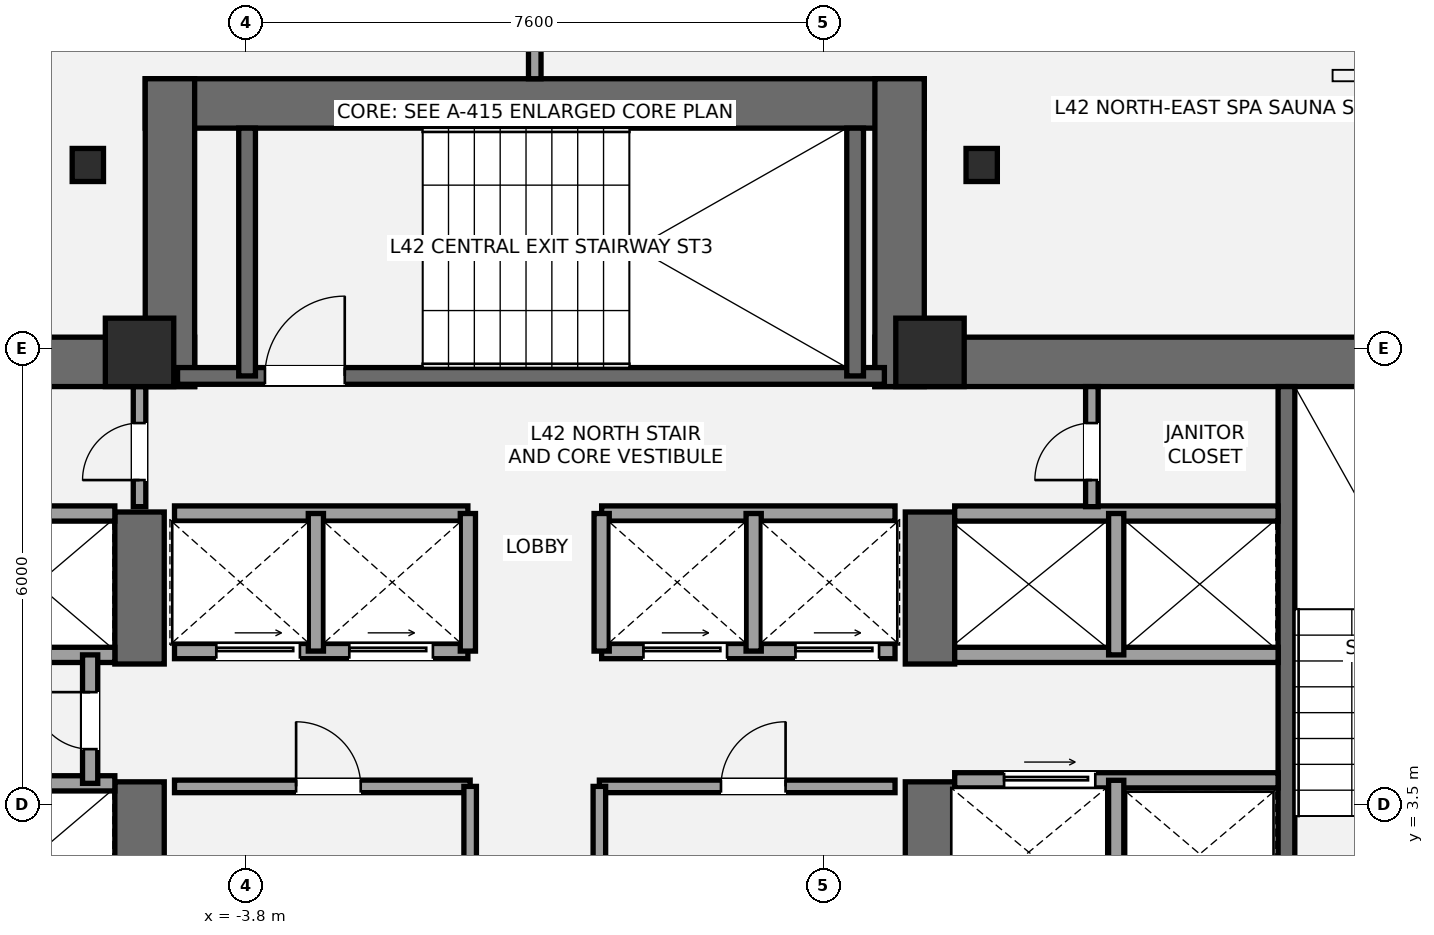
"""IFC4 building model, lengths in metres.
Left out: names, types, materials, properties, quantities, classifications, styles, units other than length and angle.
Written with IfcOpenShell. Run it as: python <this file> out.ifc"""

import sys

from ifc_helpers import new_model, si_unit, direction, frame, frame_2d, origin, origin_2d, place, context, subcontext, project, spatial, rectangle, i_section, extrude, element, fill, save


model = new_model("IFC4")
c1 = context("Model", 3, precision=1e-05, world=origin(), true_north=direction((0.0, 1.0)))
c2 = subcontext(c1, "Body", "Model", "MODEL_VIEW")
j1 = project(units=[si_unit("LENGTHUNIT", "METRE"), si_unit("PLANEANGLEUNIT", "RADIAN")], contexts=[c1])
p1 = place(None, origin())
s1 = spatial("IfcSite", under=j1, at=p1, CompositionType="ELEMENT")
p2 = place(p1, origin())
s2 = spatial("IfcBuilding", under=s1, at=p2, CompositionType="ELEMENT")
p3 = place(p2, frame((0.0, 0.0, 156.6)))
s3 = spatial("IfcBuildingStorey", under=s2, at=p3, CompositionType="ELEMENT", Elevation=156.6)
p4 = place(p3, frame((-13.8, 9.325, 0.0), z_axis=(0.0, 0.0, 1.0), x_axis=(1.0, 0.0, 0.0)))
e1 = element("IfcWall", 1, at=p4, inside=s3, PredefinedType="SHEAR", context=c2, shape_type="SweptSolid", body=[
    extrude(rectangle(XDim=9.325, YDim=0.65, at=frame_2d((4.663, 0.0))), origin(), (0.0, 0.0, 1.0), 3.2),
])
p5 = place(p3, frame((-5.2, 1.2, 0.0), z_axis=(0.0, 0.0, 1.0), x_axis=(0.0, 1.0, 0.0)))
e2 = element("IfcWall", 2, at=p5, inside=s3, PredefinedType="SHEAR", context=c2, shape_type="SweptSolid", body=[
    extrude(rectangle(XDim=2.6, YDim=0.65, at=frame_2d((1.3, 0.0))), origin(), (0.0, 0.0, 1.0), 3.2),
])
p6 = place(p3, frame((-5.2, 5.35, 0.0), z_axis=(0.0, 0.0, 1.0), x_axis=(0.0, 1.0, 0.0)))
e3 = element("IfcWall", 3, at=p6, inside=s3, PredefinedType="SHEAR", context=c2, shape_type="SweptSolid", body=[
    extrude(rectangle(XDim=2.0, YDim=0.65, at=frame_2d((1.0, 0.0))), origin(), (0.0, 0.0, 1.0), 3.2),
])
p7 = place(p3, frame((4.475, 9.325, 0.0), z_axis=(0.0, 0.0, 1.0), x_axis=(1.0, 0.0, 0.0)))
e4 = element("IfcWall", 4, at=p7, inside=s3, PredefinedType="SHEAR", context=c2, shape_type="SweptSolid", body=[
    extrude(rectangle(XDim=9.325, YDim=0.65, at=frame_2d((4.663, 0.0))), origin(), (0.0, 0.0, 1.0), 3.2),
])
p8 = place(p3, frame((5.2, 1.2, 0.0), z_axis=(0.0, 0.0, 1.0), x_axis=(0.0, 1.0, 0.0)))
e5 = element("IfcWall", 5, at=p8, inside=s3, PredefinedType="SHEAR", context=c2, shape_type="SweptSolid", body=[
    extrude(rectangle(XDim=2.6, YDim=0.65, at=frame_2d((1.3, 0.0))), origin(), (0.0, 0.0, 1.0), 3.2),
])
p9 = place(p3, frame((5.2, 5.35, 0.0), z_axis=(0.0, 0.0, 1.0), x_axis=(0.0, 1.0, 0.0)))
e6 = element("IfcWall", 6, at=p9, inside=s3, PredefinedType="SHEAR", context=c2, shape_type="SweptSolid", body=[
    extrude(rectangle(XDim=2.0, YDim=0.65, at=frame_2d((1.0, 0.0))), origin(), (0.0, 0.0, 1.0), 3.2),
])
p10 = place(p3, frame((9.89, 1.85, 0.0), z_axis=(0.0, 0.0, 1.0), x_axis=(0.0, 1.0, 0.0)))
e7 = element("IfcWall", 7, at=p10, inside=s3, PredefinedType="SHEAR", context=c2, shape_type="SweptSolid", body=[
    extrude(rectangle(XDim=7.15, YDim=0.22, at=frame_2d((3.575, 0.0))), origin(), (0.0, 0.0, 1.0), 3.2),
])
p11 = place(p3, frame((-5.125, 12.725, 0.0), z_axis=(0.0, 0.0, 1.0), x_axis=(1.0, 0.0, 0.0)))
e8 = element("IfcWall", 8, at=p11, inside=s3, PredefinedType="SHEAR", context=c2, shape_type="SweptSolid", body=[
    extrude(rectangle(XDim=10.25, YDim=0.65, at=frame_2d((5.125, 0.0))), origin(), (0.0, 0.0, 1.0), 3.2),
])
for number, where, z_axis, x_axis in (
    (9, (-4.8, 9.0, 0.0), (0.0, 0.0, 1.0), (0.0, 1.0, 0.0)),
    (10, (4.8, 9.0, 0.0), (0.0, 0.0, 1.0), (0.0, 1.0, 0.0)),
):
    element("IfcWall", number, at=place(p3, frame(where, z_axis=z_axis, x_axis=x_axis)), inside=s3, PredefinedType="SHEAR", context=c2, shape_type="SweptSolid", body=[
        extrude(rectangle(XDim=4.05, YDim=0.65, at=frame_2d((2.025, 0.0))), origin(), (0.0, 0.0, 1.0), 3.2),
    ])
p12 = place(p3, frame((-4.7, 9.14, 0.0), z_axis=(0.0, 0.0, 1.0), x_axis=(1.0, 0.0, 0.0)))
e11 = element("IfcWall", 11, at=p12, inside=s3, PredefinedType="SHEAR", context=c2, shape_type="SweptSolid", body=[
    extrude(rectangle(XDim=9.3, YDim=0.22, at=frame_2d((4.65, 0.0))), origin(), (0.0, 0.0, 1.0), 3.2),
])
p13 = place(p12, frame((1.15, 0.0, 0.0)))
e12 = element("IfcOpeningElement", 12, at=p13, cuts=e11, PredefinedType="OPENING", context=c2, shape_type="SweptSolid", body=[
    extrude(rectangle(XDim=1.05, YDim=2.15, at=frame_2d((0.525, 1.075))), frame((0.0, 0.12, 0.0), z_axis=(0.0, -1.0, 0.0), x_axis=(1.0, 0.0, 0.0)), (0.0, 0.0, 1.0), 0.24),
])
for number, where, z_axis, x_axis in (
    (13, (-3.785, 9.14, 0.0), (0.0, 0.0, 1.0), (0.0, 1.0, 0.0)),
    (14, (4.215, 9.14, 0.0), (0.0, 0.0, 1.0), (0.0, 1.0, 0.0)),
):
    element("IfcWall", number, at=place(p3, frame(where, z_axis=z_axis, x_axis=x_axis)), inside=s3, PredefinedType="SHEAR", context=c2, shape_type="SweptSolid", body=[
        extrude(rectangle(XDim=3.26, YDim=0.22, at=frame_2d((1.63, 0.0))), origin(), (0.0, 0.0, 1.0), 3.2),
    ])
for number, where, z_axis, x_axis in (
    (15, (-5.2, 9.45, 0.0), (0.0, 0.0, 1.0), (1.0, 0.0, 0.0)),
    (16, (5.2, 9.45, 0.0), (0.0, 0.0, 1.0), (1.0, 0.0, 0.0)),
):
    element("IfcColumn", number, at=place(p3, frame(where, z_axis=z_axis, x_axis=x_axis)), inside=s3, PredefinedType="COLUMN", context=c2, shape_type="SweptSolid", body=[
        extrude(rectangle(XDim=0.9, YDim=0.9, at=origin_2d()), origin(), (0.0, 0.0, 1.0), 3.2),
    ])
for number, where, z_axis, x_axis in (
    (17, (5.88, 11.915, 0.0), (0.0, 0.0, 1.0), (1.0, 0.0, 0.0)),
    (18, (-5.88, 11.915, 0.0), (0.0, 0.0, 1.0), (1.0, 0.0, 0.0)),
):
    element("IfcColumn", number, at=place(p3, frame(where, z_axis=z_axis, x_axis=x_axis)), inside=s3, PredefinedType="COLUMN", context=c2, shape_type="SweptSolid", body=[
        extrude(i_section(OverallWidth=0.412, OverallDepth=0.435, WebThickness=0.036, FlangeThickness=0.057, at=origin_2d()), origin(), (0.0, 0.0, 1.0), 3.2),
    ])
for number, where, z_axis, x_axis in (
    (19, (-9.78, 3.78, 0.0), (0.0, 0.0, 1.0), (1.0, 0.0, 0.0)),
    (20, (-9.78, 5.47, 0.0), (0.0, 0.0, 1.0), (1.0, 0.0, 0.0)),
    (21, (-9.78, 7.33, 0.0), (0.0, 0.0, 1.0), (1.0, 0.0, 0.0)),
):
    element("IfcWall", number, at=place(p3, frame(where, z_axis=z_axis, x_axis=x_axis)), inside=s3, PredefinedType="SOLIDWALL", context=c2, shape_type="SweptSolid", body=[
        extrude(rectangle(XDim=4.255, YDim=0.2, at=frame_2d((2.127, 0.0))), origin(), (0.0, 0.0, 1.0), 3.02),
    ])
p14 = place(p3, frame((-5.85, 3.78, 0.0), z_axis=(0.0, 0.0, 1.0), x_axis=(0.0, 1.0, 0.0)))
e22 = element("IfcWall", 22, at=p14, inside=s3, PredefinedType="SOLIDWALL", context=c2, shape_type="SweptSolid", body=[
    extrude(rectangle(XDim=1.69, YDim=0.2, at=frame_2d((0.845, 0.0))), origin(), (0.0, 0.0, 1.0), 3.02),
])
p15 = place(p14, frame((0.45, 0.0, 0.0)))
e23 = element("IfcOpeningElement", 23, at=p15, cuts=e22, PredefinedType="OPENING", context=c2, shape_type="SweptSolid", body=[
    extrude(rectangle(XDim=0.75, YDim=2.1, at=frame_2d((0.375, 1.05))), frame((0.0, 0.11, 0.0), z_axis=(0.0, -1.0, 0.0), x_axis=(1.0, 0.0, 0.0)), (0.0, 0.0, 1.0), 0.22),
])
p16 = place(p3, frame((5.525, 3.82, 0.0), z_axis=(0.0, 0.0, 1.0), x_axis=(1.0, 0.0, 0.0)))
e24 = element("IfcWall", 24, at=p16, inside=s3, PredefinedType="SOLIDWALL", context=c2, shape_type="SweptSolid", body=[
    extrude(rectangle(XDim=4.255, YDim=0.2, at=frame_2d((2.127, 0.0))), origin(), (0.0, 0.0, 1.0), 3.02),
])
p17 = place(p16, frame((0.65, 0.0, 0.0)))
e25 = element("IfcOpeningElement", 25, at=p17, cuts=e24, PredefinedType="OPENING", context=c2, shape_type="SweptSolid", body=[
    extrude(rectangle(XDim=1.2, YDim=2.2, at=frame_2d((0.6, 1.1))), frame((0.0, 0.11, 0.0), z_axis=(0.0, -1.0, 0.0), x_axis=(1.0, 0.0, 0.0)), (0.0, 0.0, 1.0), 0.22),
])
p18 = place(p3, frame((7.65, 1.85, 0.0), z_axis=(0.0, 0.0, 1.0), x_axis=(0.0, 1.0, 0.0)))
e26 = element("IfcWall", 26, at=p18, inside=s3, PredefinedType="SOLIDWALL", context=c2, shape_type="SweptSolid", body=[
    extrude(rectangle(XDim=1.97, YDim=0.2, at=frame_2d((0.985, 0.0))), origin(), (0.0, 0.0, 1.0), 3.02),
])
for number, where, z_axis, x_axis in (
    (27, (5.525, 5.47, 0.0), (0.0, 0.0, 1.0), (1.0, 0.0, 0.0)),
    (28, (5.525, 7.33, 0.0), (0.0, 0.0, 1.0), (1.0, 0.0, 0.0)),
):
    element("IfcWall", number, at=place(p3, frame(where, z_axis=z_axis, x_axis=x_axis)), inside=s3, PredefinedType="SOLIDWALL", context=c2, shape_type="SweptSolid", body=[
        extrude(rectangle(XDim=4.255, YDim=0.2, at=frame_2d((2.127, 0.0))), origin(), (0.0, 0.0, 1.0), 3.02),
    ])
p19 = place(p3, frame((7.65, 5.47, 0.0), z_axis=(0.0, 0.0, 1.0), x_axis=(0.0, 1.0, 0.0)))
e29 = element("IfcWall", 29, at=p19, inside=s3, PredefinedType="SOLIDWALL", context=c2, shape_type="SweptSolid", body=[
    extrude(rectangle(XDim=1.86, YDim=0.2, at=frame_2d((0.93, 0.0))), origin(), (0.0, 0.0, 1.0), 3.02),
])
p20 = place(p3, frame((-4.74, 3.74, 0.0), z_axis=(0.0, 0.0, 1.0), x_axis=(1.0, 0.0, 0.0)))
e30 = element("IfcWall", 30, at=p20, inside=s3, PredefinedType="PARTITIONING", context=c2, shape_type="SweptSolid", body=[
    extrude(rectangle(XDim=3.89, YDim=0.165, at=frame_2d((1.945, 0.0))), origin(), (0.0, 0.0, 1.0), 3.02),
])
p21 = place(p20, frame((1.6, 0.0, 0.0)))
e31 = element("IfcOpeningElement", 31, at=p21, cuts=e30, PredefinedType="OPENING", context=c2, shape_type="SweptSolid", body=[
    extrude(rectangle(XDim=0.85, YDim=2.1, at=frame_2d((0.425, 1.05))), frame((0.0, 0.093, 0.0), z_axis=(0.0, -1.0, 0.0), x_axis=(1.0, 0.0, 0.0)), (0.0, 0.0, 1.0), 0.185),
])
p22 = place(p3, frame((-0.85, 1.92, 0.0), z_axis=(0.0, 0.0, 1.0), x_axis=(0.0, 1.0, 0.0)))
e32 = element("IfcWall", 32, at=p22, inside=s3, PredefinedType="PARTITIONING", context=c2, shape_type="SweptSolid", body=[
    extrude(rectangle(XDim=1.82, YDim=0.165, at=frame_2d((0.91, 0.0))), origin(), (0.0, 0.0, 1.0), 3.02),
])
p23 = place(p3, frame((0.85, 3.74, 0.0), z_axis=(0.0, 0.0, 1.0), x_axis=(1.0, 0.0, 0.0)))
e33 = element("IfcWall", 33, at=p23, inside=s3, PredefinedType="PARTITIONING", context=c2, shape_type="SweptSolid", body=[
    extrude(rectangle(XDim=3.89, YDim=0.165, at=frame_2d((1.945, 0.0))), origin(), (0.0, 0.0, 1.0), 3.02),
])
p24 = place(p23, frame((1.6, 0.0, 0.0)))
e34 = element("IfcOpeningElement", 34, at=p24, cuts=e33, PredefinedType="OPENING", context=c2, shape_type="SweptSolid", body=[
    extrude(rectangle(XDim=0.85, YDim=2.1, at=frame_2d((0.425, 1.05))), frame((0.0, 0.093, 0.0), z_axis=(0.0, -1.0, 0.0), x_axis=(1.0, 0.0, 0.0)), (0.0, 0.0, 1.0), 0.185),
])
p25 = place(p3, frame((0.85, 1.92, 0.0), z_axis=(0.0, 0.0, 1.0), x_axis=(0.0, 1.0, 0.0)))
e35 = element("IfcWall", 35, at=p25, inside=s3, PredefinedType="PARTITIONING", context=c2, shape_type="SweptSolid", body=[
    extrude(rectangle(XDim=1.82, YDim=0.165, at=frame_2d((0.91, 0.0))), origin(), (0.0, 0.0, 1.0), 3.02),
])
p26 = place(p3, frame((-4.74, 5.52, 0.0), z_axis=(0.0, 0.0, 1.0), x_axis=(1.0, 0.0, 0.0)))
e36 = element("IfcWall", 36, at=p26, inside=s3, PredefinedType="SOLIDWALL", context=c2, shape_type="SweptSolid", body=[
    extrude(rectangle(XDim=3.86, YDim=0.2, at=frame_2d((1.93, 0.0))), origin(), (0.0, 0.0, 1.0), 3.02),
])
p27 = place(p26, frame((0.55, 0.0, 0.0)))
e37 = element("IfcOpeningElement", 37, at=p27, cuts=e36, PredefinedType="OPENING", context=c2, shape_type="SweptSolid", body=[
    extrude(rectangle(XDim=1.1, YDim=2.2, at=frame_2d((0.55, 1.1))), frame((0.0, 0.11, 0.0), z_axis=(0.0, -1.0, 0.0), x_axis=(1.0, 0.0, 0.0)), (0.0, 0.0, 1.0), 0.22),
])
p28 = place(p26, frame((2.3, 0.0, 0.0)))
e38 = element("IfcOpeningElement", 38, at=p28, cuts=e36, PredefinedType="OPENING", context=c2, shape_type="SweptSolid", body=[
    extrude(rectangle(XDim=1.1, YDim=2.2, at=frame_2d((0.55, 1.1))), frame((0.0, 0.11, 0.0), z_axis=(0.0, -1.0, 0.0), x_axis=(1.0, 0.0, 0.0)), (0.0, 0.0, 1.0), 0.22),
])
p29 = place(p3, frame((0.88, 5.52, 0.0), z_axis=(0.0, 0.0, 1.0), x_axis=(1.0, 0.0, 0.0)))
e39 = element("IfcWall", 39, at=p29, inside=s3, PredefinedType="SOLIDWALL", context=c2, shape_type="SweptSolid", body=[
    extrude(rectangle(XDim=3.86, YDim=0.2, at=frame_2d((1.93, 0.0))), origin(), (0.0, 0.0, 1.0), 3.02),
])
p30 = place(p29, frame((0.55, 0.0, 0.0)))
e40 = element("IfcOpeningElement", 40, at=p30, cuts=e39, PredefinedType="OPENING", context=c2, shape_type="SweptSolid", body=[
    extrude(rectangle(XDim=1.1, YDim=2.2, at=frame_2d((0.55, 1.1))), frame((0.0, 0.11, 0.0), z_axis=(0.0, -1.0, 0.0), x_axis=(1.0, 0.0, 0.0)), (0.0, 0.0, 1.0), 0.22),
])
p31 = place(p29, frame((2.55, 0.0, 0.0)))
e41 = element("IfcOpeningElement", 41, at=p31, cuts=e39, PredefinedType="OPENING", context=c2, shape_type="SweptSolid", body=[
    extrude(rectangle(XDim=1.1, YDim=2.2, at=frame_2d((0.55, 1.1))), frame((0.0, 0.11, 0.0), z_axis=(0.0, -1.0, 0.0), x_axis=(1.0, 0.0, 0.0)), (0.0, 0.0, 1.0), 0.22),
])
for number, where, z_axis, x_axis in (
    (42, (-4.74, 7.33, 0.0), (0.0, 0.0, 1.0), (1.0, 0.0, 0.0)),
    (43, (0.88, 7.33, 0.0), (0.0, 0.0, 1.0), (1.0, 0.0, 0.0)),
):
    element("IfcWall", number, at=place(p3, frame(where, z_axis=z_axis, x_axis=x_axis)), inside=s3, PredefinedType="SOLIDWALL", context=c2, shape_type="SweptSolid", body=[
        extrude(rectangle(XDim=3.86, YDim=0.2, at=frame_2d((1.93, 0.0))), origin(), (0.0, 0.0, 1.0), 3.02),
    ])
for number, where, z_axis, x_axis in (
    (44, (-2.88, 5.52, 0.0), (0.0, 0.0, 1.0), (0.0, 1.0, 0.0)),
    (45, (2.88, 5.52, 0.0), (0.0, 0.0, 1.0), (0.0, 1.0, 0.0)),
    (46, (-0.88, 5.52, 0.0), (0.0, 0.0, 1.0), (0.0, 1.0, 0.0)),
    (47, (0.88, 5.52, 0.0), (0.0, 0.0, 1.0), (0.0, 1.0, 0.0)),
):
    element("IfcWall", number, at=place(p3, frame(where, z_axis=z_axis, x_axis=x_axis)), inside=s3, PredefinedType="SOLIDWALL", context=c2, shape_type="SweptSolid", body=[
        extrude(rectangle(XDim=1.81, YDim=0.2, at=frame_2d((0.905, 0.0))), origin(), (0.0, 0.0, 1.0), 3.02),
    ])
p32 = place(p3, frame((-5.2, 7.42, 0.0), z_axis=(0.0, 0.0, 1.0), x_axis=(0.0, 1.0, 0.0)))
e48 = element("IfcWall", 48, at=p32, inside=s3, PredefinedType="PARTITIONING", context=c2, shape_type="SweptSolid", body=[
    extrude(rectangle(XDim=1.58, YDim=0.165, at=frame_2d((0.79, 0.0))), origin(), (0.0, 0.0, 1.0), 3.02),
])
p33 = place(p32, frame((0.35, 0.0, 0.0)))
e49 = element("IfcOpeningElement", 49, at=p33, cuts=e48, PredefinedType="OPENING", context=c2, shape_type="SweptSolid", body=[
    extrude(rectangle(XDim=0.75, YDim=2.1, at=frame_2d((0.375, 1.05))), frame((0.0, 0.093, 0.0), z_axis=(0.0, -1.0, 0.0), x_axis=(1.0, 0.0, 0.0)), (0.0, 0.0, 1.0), 0.185),
])
p34 = place(p3, frame((7.33, 7.42, 0.0), z_axis=(0.0, 0.0, 1.0), x_axis=(0.0, 1.0, 0.0)))
e50 = element("IfcWall", 50, at=p34, inside=s3, PredefinedType="PARTITIONING", context=c2, shape_type="SweptSolid", body=[
    extrude(rectangle(XDim=1.58, YDim=0.165, at=frame_2d((0.79, 0.0))), origin(), (0.0, 0.0, 1.0), 3.02),
])
p35 = place(p34, frame((0.35, 0.0, 0.0)))
e51 = element("IfcOpeningElement", 51, at=p35, cuts=e50, PredefinedType="OPENING", context=c2, shape_type="SweptSolid", body=[
    extrude(rectangle(XDim=0.75, YDim=2.1, at=frame_2d((0.375, 1.05))), frame((0.0, 0.093, 0.0), z_axis=(0.0, -1.0, 0.0), x_axis=(1.0, 0.0, 0.0)), (0.0, 0.0, 1.0), 0.185),
])
p36 = place(p3, frame((0.0, 13.05, 0.0), z_axis=(0.0, 0.0, 1.0), x_axis=(0.0, 1.0, 0.0)))
e52 = element("IfcWall", 52, at=p36, inside=s3, PredefinedType="PARTITIONING", context=c2, shape_type="SweptSolid", body=[
    extrude(rectangle(XDim=3.259, YDim=0.165, at=frame_2d((1.63, 0.0))), origin(), (0.0, 0.0, 1.0), 3.02),
])
p37 = place(p13, origin())
e53 = element("IfcDoor", 53, at=p37, inside=s3, OperationType="SINGLE_SWING_RIGHT", PredefinedType="DOOR", context=c2, shape_type="SweptSolid", body=[
    extrude(rectangle(XDim=1.05, YDim=2.15, at=frame_2d((0.525, 1.075))), frame((0.0, 0.025, 0.0), z_axis=(0.0, -1.0, 0.0), x_axis=(1.0, 0.0, 0.0)), (0.0, 0.0, 1.0), 0.05),
])
fill(e12, e53)
p38 = place(p15, origin())
e54 = element("IfcDoor", 54, at=p38, inside=s3, OperationType="SINGLE_SWING_RIGHT", PredefinedType="DOOR", context=c2, shape_type="SweptSolid", body=[
    extrude(rectangle(XDim=0.75, YDim=2.1, at=frame_2d((0.375, 1.05))), frame((0.0, 0.025, 0.0), z_axis=(0.0, -1.0, 0.0), x_axis=(1.0, 0.0, 0.0)), (0.0, 0.0, 1.0), 0.05),
])
fill(e23, e54)
p39 = place(p17, origin())
e55 = element("IfcDoor", 55, at=p39, inside=s3, OperationType="SLIDING_TO_RIGHT", PredefinedType="DOOR", context=c2, shape_type="SweptSolid", body=[
    extrude(rectangle(XDim=1.2, YDim=2.2, at=frame_2d((0.6, 1.1))), frame((0.0, 0.025, 0.0), z_axis=(0.0, -1.0, 0.0), x_axis=(1.0, 0.0, 0.0)), (0.0, 0.0, 1.0), 0.05),
])
fill(e25, e55)
p40 = place(p21, origin())
e56 = element("IfcDoor", 56, at=p40, inside=s3, OperationType="SINGLE_SWING_LEFT", PredefinedType="DOOR", context=c2, shape_type="SweptSolid", body=[
    extrude(rectangle(XDim=0.85, YDim=2.1, at=frame_2d((0.425, 1.05))), frame((0.0, 0.025, 0.0), z_axis=(0.0, -1.0, 0.0), x_axis=(1.0, 0.0, 0.0)), (0.0, 0.0, 1.0), 0.05),
])
fill(e31, e56)
p41 = place(p24, origin())
e57 = element("IfcDoor", 57, at=p41, inside=s3, OperationType="SINGLE_SWING_RIGHT", PredefinedType="DOOR", context=c2, shape_type="SweptSolid", body=[
    extrude(rectangle(XDim=0.85, YDim=2.1, at=frame_2d((0.425, 1.05))), frame((0.0, 0.025, 0.0), z_axis=(0.0, -1.0, 0.0), x_axis=(1.0, 0.0, 0.0)), (0.0, 0.0, 1.0), 0.05),
])
fill(e34, e57)
p42 = place(p27, origin())
e58 = element("IfcDoor", 58, at=p42, inside=s3, OperationType="SLIDING_TO_LEFT", PredefinedType="DOOR", context=c2, shape_type="SweptSolid", body=[
    extrude(rectangle(XDim=1.1, YDim=2.2, at=frame_2d((0.55, 1.1))), frame((0.0, 0.025, 0.0), z_axis=(0.0, -1.0, 0.0), x_axis=(1.0, 0.0, 0.0)), (0.0, 0.0, 1.0), 0.05),
])
fill(e37, e58)
p43 = place(p28, origin())
e59 = element("IfcDoor", 59, at=p43, inside=s3, OperationType="SLIDING_TO_LEFT", PredefinedType="DOOR", context=c2, shape_type="SweptSolid", body=[
    extrude(rectangle(XDim=1.1, YDim=2.2, at=frame_2d((0.55, 1.1))), frame((0.0, 0.025, 0.0), z_axis=(0.0, -1.0, 0.0), x_axis=(1.0, 0.0, 0.0)), (0.0, 0.0, 1.0), 0.05),
])
fill(e38, e59)
p44 = place(p30, origin())
e60 = element("IfcDoor", 60, at=p44, inside=s3, OperationType="SLIDING_TO_LEFT", PredefinedType="DOOR", context=c2, shape_type="SweptSolid", body=[
    extrude(rectangle(XDim=1.1, YDim=2.2, at=frame_2d((0.55, 1.1))), frame((0.0, 0.025, 0.0), z_axis=(0.0, -1.0, 0.0), x_axis=(1.0, 0.0, 0.0)), (0.0, 0.0, 1.0), 0.05),
])
fill(e40, e60)
p45 = place(p31, origin())
e61 = element("IfcDoor", 61, at=p45, inside=s3, OperationType="SLIDING_TO_LEFT", PredefinedType="DOOR", context=c2, shape_type="SweptSolid", body=[
    extrude(rectangle(XDim=1.1, YDim=2.2, at=frame_2d((0.55, 1.1))), frame((0.0, 0.025, 0.0), z_axis=(0.0, -1.0, 0.0), x_axis=(1.0, 0.0, 0.0)), (0.0, 0.0, 1.0), 0.05),
])
fill(e41, e61)
p46 = place(p33, origin())
e62 = element("IfcDoor", 62, at=p46, inside=s3, OperationType="SINGLE_SWING_LEFT", PredefinedType="DOOR", context=c2, shape_type="SweptSolid", body=[
    extrude(rectangle(XDim=0.75, YDim=2.1, at=frame_2d((0.375, 1.05))), frame((0.0, 0.025, 0.0), z_axis=(0.0, -1.0, 0.0), x_axis=(1.0, 0.0, 0.0)), (0.0, 0.0, 1.0), 0.05),
])
fill(e49, e62)
p47 = place(p35, origin())
e63 = element("IfcDoor", 63, at=p47, inside=s3, OperationType="SINGLE_SWING_LEFT", PredefinedType="DOOR", context=c2, shape_type="SweptSolid", body=[
    extrude(rectangle(XDim=0.75, YDim=2.1, at=frame_2d((0.375, 1.05))), frame((0.0, 0.025, 0.0), z_axis=(0.0, -1.0, 0.0), x_axis=(1.0, 0.0, 0.0)), (0.0, 0.0, 1.0), 0.05),
])
fill(e51, e63)
save(model, sys.argv[1])
